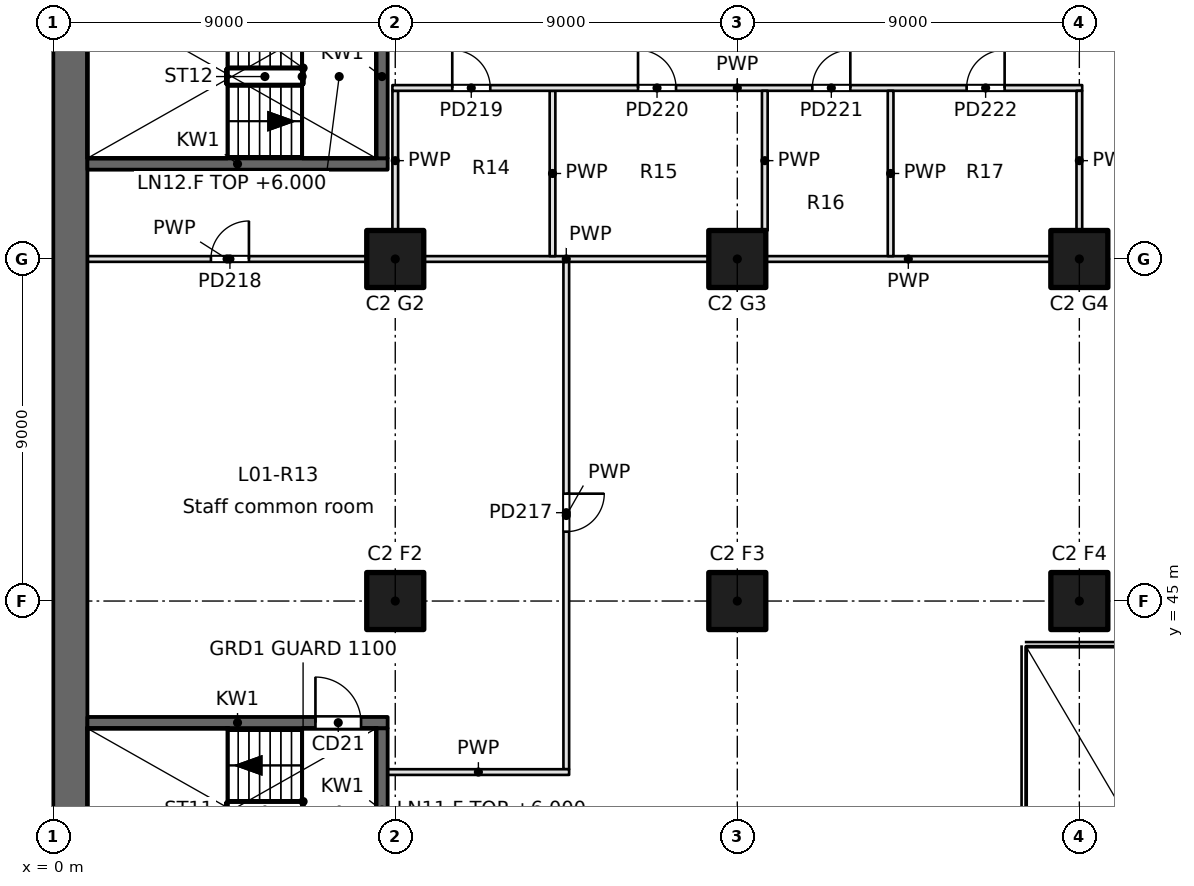
"""IFC4 building model, lengths in metres.
Left out: names, types, materials, properties, quantities, classifications, styles, units other than length and angle.
Written with IfcOpenShell. Run it as: python <this file> out.ifc"""

import sys

from ifc_helpers import new_model, si_unit, direction, frame, frame_2d, origin, origin_2d, place, context, subcontext, project, spatial, rectangle, extrude, element, fill, save


model = new_model("IFC4")
c1 = context("Model", 3, precision=1e-05, world=origin(), true_north=direction((0.0, 1.0)))
c2 = subcontext(c1, "Body", "Model", "MODEL_VIEW")
j1 = project(units=[si_unit("LENGTHUNIT", "METRE"), si_unit("PLANEANGLEUNIT", "RADIAN")], contexts=[c1])
p1 = place(None, origin())
s1 = spatial("IfcSite", under=j1, at=p1, CompositionType="ELEMENT")
p2 = place(p1, origin())
s2 = spatial("IfcBuilding", under=s1, at=p2, CompositionType="ELEMENT")
p3 = place(p2, frame((0.0, 0.0, 6.0)))
s3 = spatial("IfcBuildingStorey", under=s2, at=p3, CompositionType="ELEMENT", Elevation=6.0)
for number, where, z_axis, x_axis in (
    (1, (9.0, 45.0, 0.0), (0.0, 0.0, 1.0), (1.0, 0.0, 0.0)),
    (2, (9.0, 54.0, 0.0), (0.0, 0.0, 1.0), (1.0, 0.0, 0.0)),
    (3, (18.0, 45.0, 0.0), (0.0, 0.0, 1.0), (1.0, 0.0, 0.0)),
    (4, (18.0, 54.0, 0.0), (0.0, 0.0, 1.0), (1.0, 0.0, 0.0)),
    (5, (27.0, 45.0, 0.0), (0.0, 0.0, 1.0), (1.0, 0.0, 0.0)),
    (6, (27.0, 54.0, 0.0), (0.0, 0.0, 1.0), (1.0, 0.0, 0.0)),
):
    element("IfcColumn", number, at=place(p3, frame(where, z_axis=z_axis, x_axis=x_axis)), inside=s3, PredefinedType="COLUMN", context=c2, shape_type="SweptSolid", body=[
        extrude(rectangle(XDim=1.5, YDim=1.5, at=origin_2d()), origin(), (0.0, 0.0, 1.0), 5.4),
    ])
p4 = place(p3, frame((0.45, 94.5, 0.0), z_axis=(0.0, 0.0, 1.0), x_axis=(0.0, -1.0, 0.0)))
e7 = element("IfcWall", 7, at=p4, inside=s3, PredefinedType="SHEAR", context=c2, shape_type="SweptSolid", body=[
    extrude(rectangle(XDim=66.085, YDim=0.9, at=frame_2d((33.042, 0.0))), origin(), (0.0, 0.0, 1.0), 5.4),
])
p5 = place(p3, frame((0.9, 41.8, -0.35), z_axis=(0.0, 0.0, 1.0), x_axis=(1.0, 0.0, 0.0)))
e8 = element("IfcWall", 8, at=p5, inside=s3, PredefinedType="SOLIDWALL", context=c2, shape_type="SweptSolid", body=[
    extrude(rectangle(XDim=7.9, YDim=0.3, at=frame_2d((3.95, 0.0))), origin(), (0.0, 0.0, 1.0), 5.4),
])
p6 = place(p5, frame((6.0, 0.0, 0.35)))
e9 = element("IfcOpeningElement", 9, at=p6, cuts=e8, PredefinedType="OPENING", context=c2, shape_type="SweptSolid", body=[
    extrude(rectangle(XDim=1.2, YDim=2.1, at=frame_2d((0.6, 1.05))), frame((0.0, 0.15, 0.0), z_axis=(0.0, -1.0, 0.0), x_axis=(1.0, 0.0, 0.0)), (0.0, 0.0, 1.0), 0.3),
])
p7 = place(p3, frame((0.9, 56.5, -0.35), z_axis=(0.0, 0.0, 1.0), x_axis=(1.0, 0.0, 0.0)))
e10 = element("IfcWall", 10, at=p7, inside=s3, PredefinedType="SOLIDWALL", context=c2, shape_type="SweptSolid", body=[
    extrude(rectangle(XDim=7.9, YDim=0.3, at=frame_2d((3.95, 0.0))), origin(), (0.0, 0.0, 1.0), 5.4),
])
p8 = place(p3, frame((8.65, 37.35, -0.35), z_axis=(0.0, 0.0, 1.0), x_axis=(0.0, 1.0, 0.0)))
e11 = element("IfcWall", 11, at=p8, inside=s3, PredefinedType="SOLIDWALL", context=c2, shape_type="SweptSolid", body=[
    extrude(rectangle(XDim=4.3, YDim=0.3, at=frame_2d((2.15, 0.0))), origin(), (0.0, 0.0, 1.0), 5.4),
])
p9 = place(p3, frame((8.65, 56.65, -0.35), z_axis=(0.0, 0.0, 1.0), x_axis=(0.0, 1.0, 0.0)))
e12 = element("IfcWall", 12, at=p9, inside=s3, PredefinedType="SOLIDWALL", context=c2, shape_type="SweptSolid", body=[
    extrude(rectangle(XDim=4.3, YDim=0.3, at=frame_2d((2.15, 0.0))), origin(), (0.0, 0.0, 1.0), 5.4),
])
p10 = place(p3, frame((0.9, 54.0, 0.0), z_axis=(0.0, 0.0, 1.0), x_axis=(1.0, 0.0, 0.0)))
e13 = element("IfcWall", 13, at=p10, inside=s3, PredefinedType="PARTITIONING", context=c2, shape_type="SweptSolid", body=[
    extrude(rectangle(XDim=7.35, YDim=0.15, at=frame_2d((3.675, 0.0))), origin(), (0.0, 0.0, 1.0), 5.05),
])
p11 = place(p10, frame((3.25, 0.0, 0.0)))
e14 = element("IfcOpeningElement", 14, at=p11, cuts=e13, PredefinedType="OPENING", context=c2, shape_type="SweptSolid", body=[
    extrude(rectangle(XDim=1.0, YDim=2.1, at=frame_2d((0.5, 1.05))), frame((0.0, 0.075, 0.0), z_axis=(0.0, -1.0, 0.0), x_axis=(1.0, 0.0, 0.0)), (0.0, 0.0, 1.0), 0.15),
])
for number, where, z_axis, x_axis in (
    (15, (9.75, 54.0, 0.0), (0.0, 0.0, 1.0), (1.0, 0.0, 0.0)),
    (16, (26.25, 54.0, 0.0), (0.0, 0.0, 1.0), (-1.0, 0.0, 0.0)),
):
    element("IfcWall", number, at=place(p3, frame(where, z_axis=z_axis, x_axis=x_axis)), inside=s3, PredefinedType="PARTITIONING", context=c2, shape_type="SweptSolid", body=[
        extrude(rectangle(XDim=7.5, YDim=0.15, at=frame_2d((3.75, 0.0))), origin(), (0.0, 0.0, 1.0), 5.05),
    ])
p12 = place(p3, frame((13.5, 53.925, 0.0), z_axis=(0.0, 0.0, 1.0), x_axis=(0.0, -1.0, 0.0)))
e17 = element("IfcWall", 17, at=p12, inside=s3, PredefinedType="PARTITIONING", context=c2, shape_type="SweptSolid", body=[
    extrude(rectangle(XDim=13.35, YDim=0.15, at=frame_2d((6.675, 0.0))), origin(), (0.0, 0.0, 1.0), 5.05),
])
p13 = place(p12, frame((6.1, 0.0, 0.0)))
e18 = element("IfcOpeningElement", 18, at=p13, cuts=e17, PredefinedType="OPENING", context=c2, shape_type="SweptSolid", body=[
    extrude(rectangle(XDim=1.0, YDim=2.1, at=frame_2d((0.5, 1.05))), frame((0.0, 0.075, 0.0), z_axis=(0.0, -1.0, 0.0), x_axis=(1.0, 0.0, 0.0)), (0.0, 0.0, 1.0), 0.15),
])
p14 = place(p3, frame((13.575, 40.5, 0.0), z_axis=(0.0, 0.0, 1.0), x_axis=(-1.0, 0.0, 0.0)))
e19 = element("IfcWall", 19, at=p14, inside=s3, PredefinedType="PARTITIONING", context=c2, shape_type="SweptSolid", body=[
    extrude(rectangle(XDim=4.775, YDim=0.15, at=frame_2d((2.387, 0.0))), origin(), (0.0, 0.0, 1.0), 5.05),
])
p15 = place(p3, frame((13.138, 54.075, 0.0), z_axis=(0.0, 0.0, 1.0), x_axis=(0.0, 1.0, 0.0)))
e20 = element("IfcWall", 20, at=p15, inside=s3, PredefinedType="PARTITIONING", context=c2, shape_type="SweptSolid", body=[
    extrude(rectangle(XDim=4.35, YDim=0.15, at=frame_2d((2.175, 0.0))), origin(), (0.0, 0.0, 1.0), 5.05),
])
p16 = place(p3, frame((9.0, 54.75, 0.0), z_axis=(0.0, 0.0, 1.0), x_axis=(0.0, 1.0, 0.0)))
e21 = element("IfcWall", 21, at=p16, inside=s3, PredefinedType="PARTITIONING", context=c2, shape_type="SweptSolid", body=[
    extrude(rectangle(XDim=3.675, YDim=0.15, at=frame_2d((1.837, 0.0))), origin(), (0.0, 0.0, 1.0), 5.05),
])
p17 = place(p3, frame((8.925, 58.5, 0.0), z_axis=(0.0, 0.0, 1.0), x_axis=(1.0, 0.0, 0.0)))
e22 = element("IfcWall", 22, at=p17, inside=s3, PredefinedType="PARTITIONING", context=c2, shape_type="SweptSolid", body=[
    extrude(rectangle(XDim=18.15, YDim=0.15, at=frame_2d((9.075, 0.0))), origin(), (0.0, 0.0, 1.0), 5.05),
])
p18 = place(p17, frame((1.575, 0.0, 0.0)))
e23 = element("IfcOpeningElement", 23, at=p18, cuts=e22, PredefinedType="OPENING", context=c2, shape_type="SweptSolid", body=[
    extrude(rectangle(XDim=1.0, YDim=2.1, at=frame_2d((0.5, 1.05))), frame((0.0, 0.075, 0.0), z_axis=(0.0, -1.0, 0.0), x_axis=(1.0, 0.0, 0.0)), (0.0, 0.0, 1.0), 0.15),
])
p19 = place(p17, frame((6.463, 0.0, 0.0)))
e24 = element("IfcOpeningElement", 24, at=p19, cuts=e22, PredefinedType="OPENING", context=c2, shape_type="SweptSolid", body=[
    extrude(rectangle(XDim=1.0, YDim=2.1, at=frame_2d((0.5, 1.05))), frame((0.0, 0.075, 0.0), z_axis=(0.0, -1.0, 0.0), x_axis=(1.0, 0.0, 0.0)), (0.0, 0.0, 1.0), 0.15),
])
p20 = place(p17, frame((11.049, 0.0, 0.0)))
e25 = element("IfcOpeningElement", 25, at=p20, cuts=e22, PredefinedType="OPENING", context=c2, shape_type="SweptSolid", body=[
    extrude(rectangle(XDim=1.0, YDim=2.1, at=frame_2d((0.5, 1.05))), frame((0.0, 0.075, 0.0), z_axis=(0.0, -1.0, 0.0), x_axis=(1.0, 0.0, 0.0)), (0.0, 0.0, 1.0), 0.15),
])
p21 = place(p17, frame((15.109, 0.0, 0.0)))
e26 = element("IfcOpeningElement", 26, at=p21, cuts=e22, PredefinedType="OPENING", context=c2, shape_type="SweptSolid", body=[
    extrude(rectangle(XDim=1.0, YDim=2.1, at=frame_2d((0.5, 1.05))), frame((0.0, 0.075, 0.0), z_axis=(0.0, -1.0, 0.0), x_axis=(1.0, 0.0, 0.0)), (0.0, 0.0, 1.0), 0.15),
])
p22 = place(p3, frame((18.724, 54.75, 0.0), z_axis=(0.0, 0.0, 1.0), x_axis=(0.0, 1.0, 0.0)))
e27 = element("IfcWall", 27, at=p22, inside=s3, PredefinedType="PARTITIONING", context=c2, shape_type="SweptSolid", body=[
    extrude(rectangle(XDim=3.675, YDim=0.15, at=frame_2d((1.837, 0.0))), origin(), (0.0, 0.0, 1.0), 5.05),
])
p23 = place(p3, frame((22.034, 54.075, 0.0), z_axis=(0.0, 0.0, 1.0), x_axis=(0.0, 1.0, 0.0)))
e28 = element("IfcWall", 28, at=p23, inside=s3, PredefinedType="PARTITIONING", context=c2, shape_type="SweptSolid", body=[
    extrude(rectangle(XDim=4.35, YDim=0.15, at=frame_2d((2.175, 0.0))), origin(), (0.0, 0.0, 1.0), 5.05),
])
p24 = place(p3, frame((27.0, 58.425, 0.0), z_axis=(0.0, 0.0, 1.0), x_axis=(0.0, -1.0, 0.0)))
e29 = element("IfcWall", 29, at=p24, inside=s3, PredefinedType="PARTITIONING", context=c2, shape_type="SweptSolid", body=[
    extrude(rectangle(XDim=3.675, YDim=0.15, at=frame_2d((1.837, 0.0))), origin(), (0.0, 0.0, 1.0), 5.05),
])
p25 = place(p6, origin())
e30 = element("IfcDoor", 30, at=p25, inside=s3, OperationType="SINGLE_SWING_LEFT", PredefinedType="DOOR", context=c2, shape_type="SweptSolid", body=[
    extrude(rectangle(XDim=1.2, YDim=2.1, at=frame_2d((0.6, 1.05))), frame((0.0, 0.025, 0.0), z_axis=(0.0, -1.0, 0.0), x_axis=(1.0, 0.0, 0.0)), (0.0, 0.0, 1.0), 0.05),
])
fill(e9, e30)
p26 = place(p13, origin())
e31 = element("IfcDoor", 31, at=p26, inside=s3, OperationType="SINGLE_SWING_LEFT", PredefinedType="DOOR", context=c2, shape_type="SweptSolid", body=[
    extrude(rectangle(XDim=1.0, YDim=2.1, at=frame_2d((0.5, 1.05))), frame((0.0, 0.025, 0.0), z_axis=(0.0, -1.0, 0.0), x_axis=(1.0, 0.0, 0.0)), (0.0, 0.0, 1.0), 0.05),
])
fill(e18, e31)
p27 = place(p11, origin())
e32 = element("IfcDoor", 32, at=p27, inside=s3, OperationType="SINGLE_SWING_RIGHT", PredefinedType="DOOR", context=c2, shape_type="SweptSolid", body=[
    extrude(rectangle(XDim=1.0, YDim=2.1, at=frame_2d((0.5, 1.05))), frame((0.0, 0.025, 0.0), z_axis=(0.0, -1.0, 0.0), x_axis=(1.0, 0.0, 0.0)), (0.0, 0.0, 1.0), 0.05),
])
fill(e14, e32)
p28 = place(p18, origin())
e33 = element("IfcDoor", 33, at=p28, inside=s3, OperationType="SINGLE_SWING_LEFT", PredefinedType="DOOR", context=c2, shape_type="SweptSolid", body=[
    extrude(rectangle(XDim=1.0, YDim=2.1, at=frame_2d((0.5, 1.05))), frame((0.0, 0.025, 0.0), z_axis=(0.0, -1.0, 0.0), x_axis=(1.0, 0.0, 0.0)), (0.0, 0.0, 1.0), 0.05),
])
fill(e23, e33)
p29 = place(p19, origin())
e34 = element("IfcDoor", 34, at=p29, inside=s3, OperationType="SINGLE_SWING_LEFT", PredefinedType="DOOR", context=c2, shape_type="SweptSolid", body=[
    extrude(rectangle(XDim=1.0, YDim=2.1, at=frame_2d((0.5, 1.05))), frame((0.0, 0.025, 0.0), z_axis=(0.0, -1.0, 0.0), x_axis=(1.0, 0.0, 0.0)), (0.0, 0.0, 1.0), 0.05),
])
fill(e24, e34)
p30 = place(p20, origin())
e35 = element("IfcDoor", 35, at=p30, inside=s3, OperationType="SINGLE_SWING_RIGHT", PredefinedType="DOOR", context=c2, shape_type="SweptSolid", body=[
    extrude(rectangle(XDim=1.0, YDim=2.1, at=frame_2d((0.5, 1.05))), frame((0.0, 0.025, 0.0), z_axis=(0.0, -1.0, 0.0), x_axis=(1.0, 0.0, 0.0)), (0.0, 0.0, 1.0), 0.05),
])
fill(e25, e35)
p31 = place(p21, origin())
e36 = element("IfcDoor", 36, at=p31, inside=s3, OperationType="SINGLE_SWING_RIGHT", PredefinedType="DOOR", context=c2, shape_type="SweptSolid", body=[
    extrude(rectangle(XDim=1.0, YDim=2.1, at=frame_2d((0.5, 1.05))), frame((0.0, 0.025, 0.0), z_axis=(0.0, -1.0, 0.0), x_axis=(1.0, 0.0, 0.0)), (0.0, 0.0, 1.0), 0.05),
])
fill(e26, e36)
save(model, sys.argv[1])
